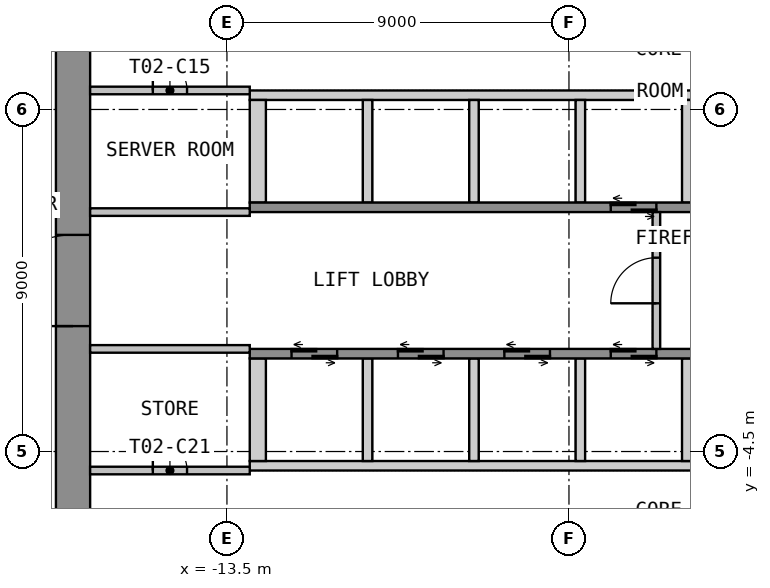
"""IFC4 building model, lengths in metres.
Left out: names, types, materials, properties, quantities, classifications, styles, units other than length and angle.
Written with IfcOpenShell. Run it as: python <this file> out.ifc"""

import sys

from ifc_helpers import new_model, si_unit, direction, frame, frame_2d, origin, place, context, subcontext, project, spatial, polyline, rectangle, outline, extrude, element, fill, save


model = new_model("IFC4")
c1 = context("Model", 3, precision=1e-05, world=origin(), true_north=direction((0.0, 1.0)))
c2 = subcontext(c1, "Body", "Model", "MODEL_VIEW")
j1 = project(units=[si_unit("LENGTHUNIT", "METRE"), si_unit("PLANEANGLEUNIT", "RADIAN")], contexts=[c1])
p1 = place(None, origin())
s1 = spatial("IfcSite", under=j1, at=p1, CompositionType="ELEMENT")
p2 = place(p1, origin())
s2 = spatial("IfcBuilding", under=s1, at=p2, CompositionType="ELEMENT")
p3 = place(p2, frame((0.0, 0.0, 41.7)))
s3 = spatial("IfcBuildingStorey", under=s2, at=p3, CompositionType="ELEMENT", Elevation=41.7)
p4 = place(p3, frame((-17.55, -12.6, 0.0), z_axis=(0.0, 0.0, 1.0), x_axis=(0.0, 1.0, 0.0)))
e1 = element("IfcWall", 1, at=p4, inside=s3, PredefinedType="SHEAR", context=c2, shape_type="SweptSolid", body=[
    extrude(rectangle(XDim=25.2, YDim=0.9, at=frame_2d((12.6, 0.0))), origin(), (0.0, 0.0, 1.0), 3.525),
])
p5 = place(p4, frame((11.4, 0.0, 0.0)))
e2 = element("IfcOpeningElement", 2, at=p5, cuts=e1, PredefinedType="OPENING", context=c2, shape_type="SweptSolid", body=[
    extrude(rectangle(XDim=2.4, YDim=2.1, at=frame_2d((1.2, 1.05))), frame((0.0, 0.46, 0.0), z_axis=(0.0, -1.0, 0.0), x_axis=(1.0, 0.0, 0.0)), (0.0, 0.0, 1.0), 0.92),
])
p6 = place(p3, origin())
e3 = element("IfcWall", 3, at=p6, inside=s3, PredefinedType="SHEAR", context=c2, shape_type="SweptSolid", body=[
    extrude(outline(polyline([(-12.9, 4.75), (12.9, 4.75), (12.9, 5.0), (-12.9, 5.0), (-12.9, 4.75)])), origin(), (0.0, 0.0, 1.0), 3.525),
])
p7 = place(p3, origin())
e4 = element("IfcWall", 4, at=p7, inside=s3, PredefinedType="SHEAR", context=c2, shape_type="SweptSolid", body=[
    extrude(outline(polyline([(-12.9, 2.05), (-12.475, 2.05), (-12.475, 4.75), (-12.9, 4.75), (-12.9, 2.05)])), origin(), (0.0, 0.0, 1.0), 3.525),
])
p8 = place(p3, origin())
e5 = element("IfcWall", 5, at=p8, inside=s3, PredefinedType="SHEAR", context=c2, shape_type="SweptSolid", body=[
    extrude(outline(polyline([(-9.925, 2.05), (-9.675, 2.05), (-9.675, 4.75), (-9.925, 4.75), (-9.925, 2.05)])), origin(), (0.0, 0.0, 1.0), 3.525),
])
p9 = place(p3, origin())
e6 = element("IfcWall", 6, at=p9, inside=s3, PredefinedType="SHEAR", context=c2, shape_type="SweptSolid", body=[
    extrude(outline(polyline([(-7.125, 2.05), (-6.875, 2.05), (-6.875, 4.75), (-7.125, 4.75), (-7.125, 2.05)])), origin(), (0.0, 0.0, 1.0), 3.525),
])
p10 = place(p3, origin())
e7 = element("IfcWall", 7, at=p10, inside=s3, PredefinedType="SHEAR", context=c2, shape_type="SweptSolid", body=[
    extrude(outline(polyline([(-4.325, 2.05), (-4.075, 2.05), (-4.075, 4.75), (-4.325, 4.75), (-4.325, 2.05)])), origin(), (0.0, 0.0, 1.0), 3.525),
])
p11 = place(p3, origin())
e8 = element("IfcWall", 8, at=p11, inside=s3, PredefinedType="SHEAR", context=c2, shape_type="SweptSolid", body=[
    extrude(outline(polyline([(-1.525, 2.05), (-1.275, 2.05), (-1.275, 4.75), (-1.525, 4.75), (-1.525, 2.05)])), origin(), (0.0, 0.0, 1.0), 3.525),
])
p12 = place(p3, frame((-12.9, 1.925, 0.0), z_axis=(0.0, 0.0, 1.0), x_axis=(1.0, 0.0, 0.0)))
e9 = element("IfcWall", 9, at=p12, inside=s3, PredefinedType="SHEAR", context=c2, shape_type="SweptSolid", body=[
    extrude(rectangle(XDim=25.8, YDim=0.25, at=frame_2d((12.9, 0.0))), origin(), (0.0, 0.0, 1.0), 3.525),
])
p13 = place(p12, frame((9.5, 0.0, 0.0)))
e10 = element("IfcOpeningElement", 10, at=p13, cuts=e9, PredefinedType="OPENING", context=c2, shape_type="SweptSolid", body=[
    extrude(rectangle(XDim=1.2, YDim=2.1, at=frame_2d((0.6, 1.05))), frame((0.0, 0.135, 0.0), z_axis=(0.0, -1.0, 0.0), x_axis=(1.0, 0.0, 0.0)), (0.0, 0.0, 1.0), 0.27),
])
p14 = place(p12, frame((12.3, 0.0, 0.0)))
e11 = element("IfcOpeningElement", 11, at=p14, cuts=e9, PredefinedType="OPENING", context=c2, shape_type="SweptSolid", body=[
    extrude(rectangle(XDim=1.2, YDim=2.1, at=frame_2d((0.6, 1.05))), frame((0.0, 0.135, 0.0), z_axis=(0.0, -1.0, 0.0), x_axis=(1.0, 0.0, 0.0)), (0.0, 0.0, 1.0), 0.27),
])
p15 = place(p12, frame((15.1, 0.0, 0.0)))
e12 = element("IfcOpeningElement", 12, at=p15, cuts=e9, PredefinedType="OPENING", context=c2, shape_type="SweptSolid", body=[
    extrude(rectangle(XDim=1.2, YDim=2.1, at=frame_2d((0.6, 1.05))), frame((0.0, 0.135, 0.0), z_axis=(0.0, -1.0, 0.0), x_axis=(1.0, 0.0, 0.0)), (0.0, 0.0, 1.0), 0.27),
])
p16 = place(p12, frame((17.9, 0.0, 0.0)))
e13 = element("IfcOpeningElement", 13, at=p16, cuts=e9, PredefinedType="OPENING", context=c2, shape_type="SweptSolid", body=[
    extrude(rectangle(XDim=1.2, YDim=2.1, at=frame_2d((0.6, 1.05))), frame((0.0, 0.135, 0.0), z_axis=(0.0, -1.0, 0.0), x_axis=(1.0, 0.0, 0.0)), (0.0, 0.0, 1.0), 0.27),
])
p17 = place(p12, frame((20.7, 0.0, 0.0)))
e14 = element("IfcOpeningElement", 14, at=p17, cuts=e9, PredefinedType="OPENING", context=c2, shape_type="SweptSolid", body=[
    extrude(rectangle(XDim=1.2, YDim=2.1, at=frame_2d((0.6, 1.05))), frame((0.0, 0.135, 0.0), z_axis=(0.0, -1.0, 0.0), x_axis=(1.0, 0.0, 0.0)), (0.0, 0.0, 1.0), 0.27),
])
p18 = place(p12, frame((23.5, 0.0, 0.0)))
e15 = element("IfcOpeningElement", 15, at=p18, cuts=e9, PredefinedType="OPENING", context=c2, shape_type="SweptSolid", body=[
    extrude(rectangle(XDim=1.2, YDim=2.1, at=frame_2d((0.6, 1.05))), frame((0.0, 0.135, 0.0), z_axis=(0.0, -1.0, 0.0), x_axis=(1.0, 0.0, 0.0)), (0.0, 0.0, 1.0), 0.27),
])
p19 = place(p3, origin())
e16 = element("IfcWall", 16, at=p19, inside=s3, PredefinedType="SHEAR", context=c2, shape_type="SweptSolid", body=[
    extrude(outline(polyline([(-12.9, -5.0), (12.9, -5.0), (12.9, -4.75), (-12.9, -4.75), (-12.9, -5.0)])), origin(), (0.0, 0.0, 1.0), 3.525),
])
p20 = place(p3, origin())
e17 = element("IfcWall", 17, at=p20, inside=s3, PredefinedType="SHEAR", context=c2, shape_type="SweptSolid", body=[
    extrude(outline(polyline([(-12.9, -4.75), (-12.475, -4.75), (-12.475, -2.05), (-12.9, -2.05), (-12.9, -4.75)])), origin(), (0.0, 0.0, 1.0), 3.525),
])
p21 = place(p3, origin())
e18 = element("IfcWall", 18, at=p21, inside=s3, PredefinedType="SHEAR", context=c2, shape_type="SweptSolid", body=[
    extrude(outline(polyline([(-9.925, -4.75), (-9.675, -4.75), (-9.675, -2.05), (-9.925, -2.05), (-9.925, -4.75)])), origin(), (0.0, 0.0, 1.0), 3.525),
])
p22 = place(p3, origin())
e19 = element("IfcWall", 19, at=p22, inside=s3, PredefinedType="SHEAR", context=c2, shape_type="SweptSolid", body=[
    extrude(outline(polyline([(-7.125, -4.75), (-6.875, -4.75), (-6.875, -2.05), (-7.125, -2.05), (-7.125, -4.75)])), origin(), (0.0, 0.0, 1.0), 3.525),
])
p23 = place(p3, origin())
e20 = element("IfcWall", 20, at=p23, inside=s3, PredefinedType="SHEAR", context=c2, shape_type="SweptSolid", body=[
    extrude(outline(polyline([(-4.325, -4.75), (-4.075, -4.75), (-4.075, -2.05), (-4.325, -2.05), (-4.325, -4.75)])), origin(), (0.0, 0.0, 1.0), 3.525),
])
p24 = place(p3, origin())
e21 = element("IfcWall", 21, at=p24, inside=s3, PredefinedType="SHEAR", context=c2, shape_type="SweptSolid", body=[
    extrude(outline(polyline([(-1.525, -4.75), (-1.275, -4.75), (-1.275, -2.05), (-1.525, -2.05), (-1.525, -4.75)])), origin(), (0.0, 0.0, 1.0), 3.525),
])
p25 = place(p3, frame((-12.9, -1.925, 0.0), z_axis=(0.0, 0.0, 1.0), x_axis=(1.0, 0.0, 0.0)))
e22 = element("IfcWall", 22, at=p25, inside=s3, PredefinedType="SHEAR", context=c2, shape_type="SweptSolid", body=[
    extrude(rectangle(XDim=25.8, YDim=0.25, at=frame_2d((12.9, 0.0))), origin(), (0.0, 0.0, 1.0), 3.525),
])
p26 = place(p25, frame((1.1, 0.0, 0.0)))
e23 = element("IfcOpeningElement", 23, at=p26, cuts=e22, PredefinedType="OPENING", context=c2, shape_type="SweptSolid", body=[
    extrude(rectangle(XDim=1.2, YDim=2.1, at=frame_2d((0.6, 1.05))), frame((0.0, 0.135, 0.0), z_axis=(0.0, -1.0, 0.0), x_axis=(1.0, 0.0, 0.0)), (0.0, 0.0, 1.0), 0.27),
])
p27 = place(p25, frame((3.9, 0.0, 0.0)))
e24 = element("IfcOpeningElement", 24, at=p27, cuts=e22, PredefinedType="OPENING", context=c2, shape_type="SweptSolid", body=[
    extrude(rectangle(XDim=1.2, YDim=2.1, at=frame_2d((0.6, 1.05))), frame((0.0, 0.135, 0.0), z_axis=(0.0, -1.0, 0.0), x_axis=(1.0, 0.0, 0.0)), (0.0, 0.0, 1.0), 0.27),
])
p28 = place(p25, frame((6.7, 0.0, 0.0)))
e25 = element("IfcOpeningElement", 25, at=p28, cuts=e22, PredefinedType="OPENING", context=c2, shape_type="SweptSolid", body=[
    extrude(rectangle(XDim=1.2, YDim=2.1, at=frame_2d((0.6, 1.05))), frame((0.0, 0.135, 0.0), z_axis=(0.0, -1.0, 0.0), x_axis=(1.0, 0.0, 0.0)), (0.0, 0.0, 1.0), 0.27),
])
p29 = place(p25, frame((9.5, 0.0, 0.0)))
e26 = element("IfcOpeningElement", 26, at=p29, cuts=e22, PredefinedType="OPENING", context=c2, shape_type="SweptSolid", body=[
    extrude(rectangle(XDim=1.2, YDim=2.1, at=frame_2d((0.6, 1.05))), frame((0.0, 0.135, 0.0), z_axis=(0.0, -1.0, 0.0), x_axis=(1.0, 0.0, 0.0)), (0.0, 0.0, 1.0), 0.27),
])
p30 = place(p25, frame((12.3, 0.0, 0.0)))
e27 = element("IfcOpeningElement", 27, at=p30, cuts=e22, PredefinedType="OPENING", context=c2, shape_type="SweptSolid", body=[
    extrude(rectangle(XDim=1.2, YDim=2.1, at=frame_2d((0.6, 1.05))), frame((0.0, 0.135, 0.0), z_axis=(0.0, -1.0, 0.0), x_axis=(1.0, 0.0, 0.0)), (0.0, 0.0, 1.0), 0.27),
])
p31 = place(p25, frame((15.1, 0.0, 0.0)))
e28 = element("IfcOpeningElement", 28, at=p31, cuts=e22, PredefinedType="OPENING", context=c2, shape_type="SweptSolid", body=[
    extrude(rectangle(XDim=1.2, YDim=2.1, at=frame_2d((0.6, 1.05))), frame((0.0, 0.135, 0.0), z_axis=(0.0, -1.0, 0.0), x_axis=(1.0, 0.0, 0.0)), (0.0, 0.0, 1.0), 0.27),
])
p32 = place(p3, frame((-2.2, -1.8, 0.0), z_axis=(0.0, 0.0, 1.0), x_axis=(0.0, 1.0, 0.0)))
e29 = element("IfcWall", 29, at=p32, inside=s3, PredefinedType="PARTITIONING", context=c2, shape_type="SweptSolid", body=[
    extrude(rectangle(XDim=3.6, YDim=0.2, at=frame_2d((1.8, 0.0))), origin(), (0.0, 0.0, 1.0), 3.525),
])
p33 = place(p32, frame((1.2, 0.0, 0.0)))
e30 = element("IfcOpeningElement", 30, at=p33, cuts=e29, PredefinedType="OPENING", context=c2, shape_type="SweptSolid", body=[
    extrude(rectangle(XDim=1.2, YDim=2.1, at=frame_2d((0.6, 1.05))), frame((0.0, 0.11, 0.0), z_axis=(0.0, -1.0, 0.0), x_axis=(1.0, 0.0, 0.0)), (0.0, 0.0, 1.0), 0.22),
])
p34 = place(p3, frame((-17.1, 5.0, 0.0), z_axis=(0.0, 0.0, 1.0), x_axis=(1.0, 0.0, 0.0)))
e31 = element("IfcWall", 31, at=p34, inside=s3, PredefinedType="PARTITIONING", context=c2, shape_type="SweptSolid", body=[
    extrude(rectangle(XDim=4.2, YDim=0.2, at=frame_2d((2.1, 0.0))), origin(), (0.0, 0.0, 1.0), 3.525),
])
p35 = place(p34, frame((1.65, 0.0, 0.0)))
e32 = element("IfcOpeningElement", 32, at=p35, cuts=e31, PredefinedType="OPENING", context=c2, shape_type="SweptSolid", body=[
    extrude(rectangle(XDim=0.9, YDim=2.1, at=frame_2d((0.45, 1.05))), frame((0.0, 0.11, 0.0), z_axis=(0.0, -1.0, 0.0), x_axis=(1.0, 0.0, 0.0)), (0.0, 0.0, 1.0), 0.22),
])
p36 = place(p3, frame((-17.1, 1.8, 0.0), z_axis=(0.0, 0.0, 1.0), x_axis=(1.0, 0.0, 0.0)))
e33 = element("IfcWall", 33, at=p36, inside=s3, PredefinedType="PARTITIONING", context=c2, shape_type="SweptSolid", body=[
    extrude(rectangle(XDim=4.2, YDim=0.2, at=frame_2d((2.1, 0.0))), origin(), (0.0, 0.0, 1.0), 3.525),
])
p37 = place(p3, frame((-17.1, -5.0, 0.0), z_axis=(0.0, 0.0, 1.0), x_axis=(1.0, 0.0, 0.0)))
e34 = element("IfcWall", 34, at=p37, inside=s3, PredefinedType="PARTITIONING", context=c2, shape_type="SweptSolid", body=[
    extrude(rectangle(XDim=4.2, YDim=0.2, at=frame_2d((2.1, 0.0))), origin(), (0.0, 0.0, 1.0), 3.525),
])
p38 = place(p37, frame((1.65, 0.0, 0.0)))
e35 = element("IfcOpeningElement", 35, at=p38, cuts=e34, PredefinedType="OPENING", context=c2, shape_type="SweptSolid", body=[
    extrude(rectangle(XDim=0.9, YDim=2.1, at=frame_2d((0.45, 1.05))), frame((0.0, 0.11, 0.0), z_axis=(0.0, -1.0, 0.0), x_axis=(1.0, 0.0, 0.0)), (0.0, 0.0, 1.0), 0.22),
])
p39 = place(p3, frame((-17.1, -1.8, 0.0), z_axis=(0.0, 0.0, 1.0), x_axis=(1.0, 0.0, 0.0)))
e36 = element("IfcWall", 36, at=p39, inside=s3, PredefinedType="PARTITIONING", context=c2, shape_type="SweptSolid", body=[
    extrude(rectangle(XDim=4.2, YDim=0.2, at=frame_2d((2.1, 0.0))), origin(), (0.0, 0.0, 1.0), 3.525),
])
p40 = place(p5, origin())
e37 = element("IfcDoor", 37, at=p40, inside=s3, OperationType="DOUBLE_DOOR_DOUBLE_SWING", PredefinedType="DOOR", context=c2, shape_type="SweptSolid", body=[
    extrude(rectangle(XDim=2.4, YDim=2.1, at=frame_2d((1.2, 1.05))), frame((0.0, 0.025, 0.0), z_axis=(0.0, -1.0, 0.0), x_axis=(1.0, 0.0, 0.0)), (0.0, 0.0, 1.0), 0.05),
])
fill(e2, e37)
p41 = place(p13, origin())
e38 = element("IfcDoor", 38, at=p41, inside=s3, OperationType="DOUBLE_DOOR_SLIDING", PredefinedType="DOOR", context=c2, shape_type="SweptSolid", body=[
    extrude(rectangle(XDim=1.2, YDim=2.1, at=frame_2d((0.6, 1.05))), frame((0.0, 0.025, 0.0), z_axis=(0.0, -1.0, 0.0), x_axis=(1.0, 0.0, 0.0)), (0.0, 0.0, 1.0), 0.05),
])
fill(e10, e38)
p42 = place(p26, origin())
e39 = element("IfcDoor", 39, at=p42, inside=s3, OperationType="DOUBLE_DOOR_SLIDING", PredefinedType="DOOR", context=c2, shape_type="SweptSolid", body=[
    extrude(rectangle(XDim=1.2, YDim=2.1, at=frame_2d((0.6, 1.05))), frame((0.0, 0.025, 0.0), z_axis=(0.0, -1.0, 0.0), x_axis=(1.0, 0.0, 0.0)), (0.0, 0.0, 1.0), 0.05),
])
fill(e23, e39)
p43 = place(p27, origin())
e40 = element("IfcDoor", 40, at=p43, inside=s3, OperationType="DOUBLE_DOOR_SLIDING", PredefinedType="DOOR", context=c2, shape_type="SweptSolid", body=[
    extrude(rectangle(XDim=1.2, YDim=2.1, at=frame_2d((0.6, 1.05))), frame((0.0, 0.025, 0.0), z_axis=(0.0, -1.0, 0.0), x_axis=(1.0, 0.0, 0.0)), (0.0, 0.0, 1.0), 0.05),
])
fill(e24, e40)
p44 = place(p28, origin())
e41 = element("IfcDoor", 41, at=p44, inside=s3, OperationType="DOUBLE_DOOR_SLIDING", PredefinedType="DOOR", context=c2, shape_type="SweptSolid", body=[
    extrude(rectangle(XDim=1.2, YDim=2.1, at=frame_2d((0.6, 1.05))), frame((0.0, 0.025, 0.0), z_axis=(0.0, -1.0, 0.0), x_axis=(1.0, 0.0, 0.0)), (0.0, 0.0, 1.0), 0.05),
])
fill(e25, e41)
p45 = place(p29, origin())
e42 = element("IfcDoor", 42, at=p45, inside=s3, OperationType="DOUBLE_DOOR_SLIDING", PredefinedType="DOOR", context=c2, shape_type="SweptSolid", body=[
    extrude(rectangle(XDim=1.2, YDim=2.1, at=frame_2d((0.6, 1.05))), frame((0.0, 0.025, 0.0), z_axis=(0.0, -1.0, 0.0), x_axis=(1.0, 0.0, 0.0)), (0.0, 0.0, 1.0), 0.05),
])
fill(e26, e42)
p46 = place(p33, origin())
e43 = element("IfcDoor", 43, at=p46, inside=s3, OperationType="SINGLE_SWING_LEFT", PredefinedType="DOOR", context=c2, shape_type="SweptSolid", body=[
    extrude(rectangle(XDim=1.2, YDim=2.1, at=frame_2d((0.6, 1.05))), frame((0.0, 0.025, 0.0), z_axis=(0.0, -1.0, 0.0), x_axis=(1.0, 0.0, 0.0)), (0.0, 0.0, 1.0), 0.05),
])
fill(e30, e43)
p47 = place(p35, origin())
e44 = element("IfcDoor", 44, at=p47, inside=s3, OperationType="SINGLE_SWING_LEFT", PredefinedType="DOOR", context=c2, shape_type="SweptSolid", body=[
    extrude(rectangle(XDim=0.9, YDim=2.1, at=frame_2d((0.45, 1.05))), frame((0.0, 0.025, 0.0), z_axis=(0.0, -1.0, 0.0), x_axis=(1.0, 0.0, 0.0)), (0.0, 0.0, 1.0), 0.05),
])
fill(e32, e44)
p48 = place(p38, origin())
e45 = element("IfcDoor", 45, at=p48, inside=s3, OperationType="SINGLE_SWING_LEFT", PredefinedType="DOOR", context=c2, shape_type="SweptSolid", body=[
    extrude(rectangle(XDim=0.9, YDim=2.1, at=frame_2d((0.45, 1.05))), frame((0.0, 0.025, 0.0), z_axis=(0.0, -1.0, 0.0), x_axis=(1.0, 0.0, 0.0)), (0.0, 0.0, 1.0), 0.05),
])
fill(e35, e45)
save(model, sys.argv[1])
